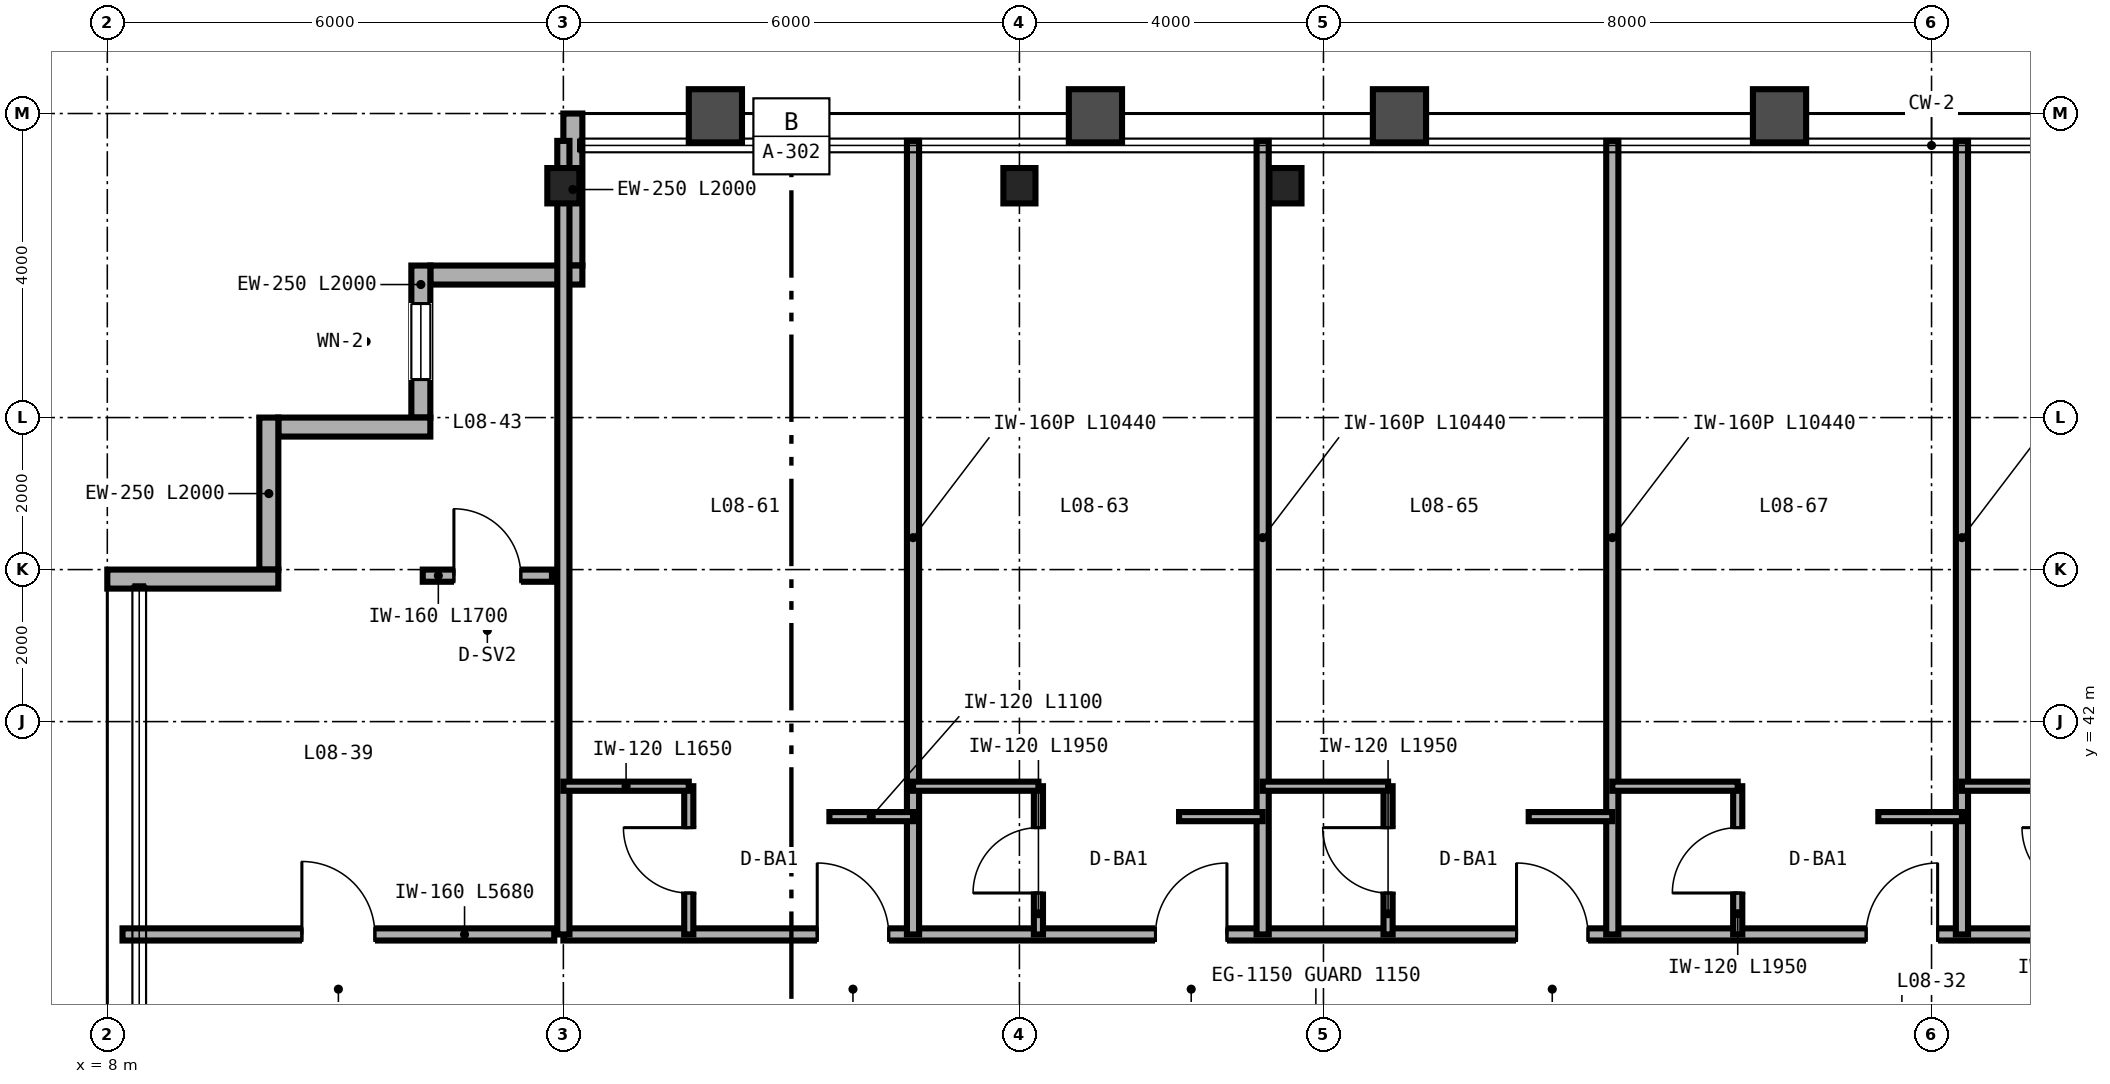
"""IFC4 building model, lengths in metres.
Left out: names, types, materials, properties, quantities, classifications, styles, units other than length and angle.
Written with IfcOpenShell. Run it as: python <this file> out.ifc"""

import sys

from ifc_helpers import new_model, si_unit, direction, frame, frame_2d, origin, origin_2d, place, context, subcontext, project, spatial, rectangle, i_section, extrude, source, transform, mapped, element, fill, save


model = new_model("IFC4")
c1 = context("Model", 3, precision=1e-05, world=origin(), true_north=direction((0.0, 1.0)))
c2 = subcontext(c1, "Body", "Model", "MODEL_VIEW")
j1 = project(units=[si_unit("LENGTHUNIT", "METRE"), si_unit("PLANEANGLEUNIT", "RADIAN")], contexts=[c1])
p1 = place(None, origin())
s1 = spatial("IfcSite", under=j1, at=p1, CompositionType="ELEMENT")
p2 = place(p1, origin())
s2 = spatial("IfcBuilding", under=s1, at=p2, CompositionType="ELEMENT")
p3 = place(p2, frame((0.0, 0.0, 38.4)))
s3 = spatial("IfcBuildingStorey", under=s2, at=p3, CompositionType="ELEMENT", Elevation=38.4)
m1 = source(origin(), c2, "Body", "SweptSolid", [
    extrude(i_section(OverallWidth=0.422, OverallDepth=0.465, WebThickness=0.045, FlangeThickness=0.073, FilletRadius=0.025, at=origin_2d()), origin(), (0.0, 0.0, 1.0), 3.35),
])
for number, where, z_axis, x_axis in (
    (1, (14.0, 49.05, 0.0), (0.0, 0.0, 1.0), (1.0, 0.0, 0.0)),
    (2, (20.0, 49.05, 0.0), (0.0, 0.0, 1.0), (1.0, 0.0, 0.0)),
    (3, (23.5, 49.05, 0.0), (0.0, 0.0, 1.0), (1.0, 0.0, 0.0)),
):
    element("IfcColumn", number, at=place(p3, frame(where, z_axis=z_axis, x_axis=x_axis)), inside=s3, PredefinedType="COLUMN", context=c2, shape_type="MappedRepresentation", body=[
        mapped(m1, transform((0.0, 0.0, 0.0), scale=1.0)),
    ])
p4 = place(p3, frame((14.125, 50.0, 0.0), z_axis=(0.0, 0.0, 1.0), x_axis=(0.0, -1.0, 0.0)))
e4 = element("IfcWall", 4, at=p4, inside=s3, PredefinedType="SOLIDWALL", context=c2, shape_type="SweptSolid", body=[
    extrude(rectangle(XDim=2.0, YDim=0.25, at=frame_2d((1.0, 0.0))), origin(), (0.0, 0.0, 1.0), 2.657),
])
p5 = place(p3, frame((14.25, 47.875, 0.0), z_axis=(0.0, 0.0, 1.0), x_axis=(-1.0, 0.0, 0.0)))
e5 = element("IfcWall", 5, at=p5, inside=s3, PredefinedType="SOLIDWALL", context=c2, shape_type="SweptSolid", body=[
    extrude(rectangle(XDim=2.0, YDim=0.25, at=frame_2d((1.0, 0.0))), origin(), (0.0, 0.0, 1.0), 3.35),
])
p6 = place(p3, frame((12.125, 48.0, 0.0), z_axis=(0.0, 0.0, 1.0), x_axis=(0.0, -1.0, 0.0)))
e6 = element("IfcWall", 6, at=p6, inside=s3, PredefinedType="SOLIDWALL", context=c2, shape_type="SweptSolid", body=[
    extrude(rectangle(XDim=2.0, YDim=0.25, at=frame_2d((1.0, 0.0))), origin(), (0.0, 0.0, 1.0), 3.35),
])
p7 = place(p6, frame((0.5, 0.0, 0.85)))
e7 = element("IfcOpeningElement", 7, at=p7, cuts=e6, PredefinedType="OPENING", context=c2, shape_type="SweptSolid", body=[
    extrude(rectangle(XDim=1.0, YDim=1.9, at=frame_2d((0.5, 0.95))), frame((0.0, 0.135, 0.0), z_axis=(0.0, -1.0, 0.0), x_axis=(1.0, 0.0, 0.0)), (0.0, 0.0, 1.0), 0.27),
])
for number, where, z_axis, x_axis in (
    (8, (12.25, 45.875, 0.0), (0.0, 0.0, 1.0), (-1.0, 0.0, 0.0)),
    (9, (10.125, 46.0, 0.0), (0.0, 0.0, 1.0), (0.0, -1.0, 0.0)),
):
    element("IfcWall", number, at=place(p3, frame(where, z_axis=z_axis, x_axis=x_axis)), inside=s3, PredefinedType="SOLIDWALL", context=c2, shape_type="SweptSolid", body=[
        extrude(rectangle(XDim=2.0, YDim=0.25, at=frame_2d((1.0, 0.0))), origin(), (0.0, 0.0, 1.0), 3.35),
    ])
p8 = place(p3, frame((10.25, 43.875, 0.0), z_axis=(0.0, 0.0, 1.0), x_axis=(-1.0, 0.0, 0.0)))
e10 = element("IfcWall", 10, at=p8, inside=s3, PredefinedType="SOLIDWALL", context=c2, shape_type="SweptSolid", body=[
    extrude(rectangle(XDim=2.25, YDim=0.25, at=frame_2d((1.125, 0.0))), origin(), (0.0, 0.0, 1.0), 3.35),
])
p9 = place(p3, frame((8.2, 39.2, 0.0), z_axis=(0.0, 0.0, 1.0), x_axis=(1.0, 0.0, 0.0)))
e11 = element("IfcWall", 11, at=p9, inside=s3, PredefinedType="PARTITIONING", context=c2, shape_type="SweptSolid", body=[
    extrude(rectangle(XDim=5.68, YDim=0.16, at=frame_2d((2.84, 0.0))), origin(), (0.0, 0.0, 1.0), 3.35),
])
p10 = place(p9, frame((2.36, 0.0, 0.0)))
e12 = element("IfcOpeningElement", 12, at=p10, cuts=e11, PredefinedType="OPENING", context=c2, shape_type="SweptSolid", body=[
    extrude(rectangle(XDim=0.96, YDim=2.15, at=frame_2d((0.48, 1.075))), frame((0.0, 0.09, 0.0), z_axis=(0.0, -1.0, 0.0), x_axis=(1.0, 0.0, 0.0)), (0.0, 0.0, 1.0), 0.18),
])
p11 = place(p3, frame((12.15, 43.92, 0.0), z_axis=(0.0, 0.0, 1.0), x_axis=(1.0, 0.0, 0.0)))
e13 = element("IfcWall", 13, at=p11, inside=s3, PredefinedType="PARTITIONING", context=c2, shape_type="SweptSolid", body=[
    extrude(rectangle(XDim=1.7, YDim=0.16, at=frame_2d((0.85, 0.0))), origin(), (0.0, 0.0, 1.0), 3.35),
])
p12 = place(p11, frame((0.41, 0.0, 0.0)))
e14 = element("IfcOpeningElement", 14, at=p12, cuts=e13, PredefinedType="OPENING", context=c2, shape_type="SweptSolid", body=[
    extrude(rectangle(XDim=0.88, YDim=2.15, at=frame_2d((0.44, 1.075))), frame((0.0, 0.09, 0.0), z_axis=(0.0, -1.0, 0.0), x_axis=(1.0, 0.0, 0.0)), (0.0, 0.0, 1.0), 0.18),
])
p13 = place(p3, frame((14.0, 39.2, 0.0), z_axis=(0.0, 0.0, 1.0), x_axis=(1.0, 0.0, 0.0)))
e15 = element("IfcWall", 15, at=p13, inside=s3, PredefinedType="PARTITIONING", context=c2, shape_type="SweptSolid", body=[
    extrude(rectangle(XDim=36.0, YDim=0.16, at=frame_2d((18.0, 0.0))), origin(), (0.0, 0.0, 1.0), 2.571),
])
p14 = place(p13, frame((3.34, 0.0, 0.0)))
e16 = element("IfcOpeningElement", 16, at=p14, cuts=e15, PredefinedType="OPENING", context=c2, shape_type="SweptSolid", body=[
    extrude(rectangle(XDim=0.94, YDim=2.15, at=frame_2d((0.47, 1.075))), frame((0.0, 0.09, 0.0), z_axis=(0.0, -1.0, 0.0), x_axis=(1.0, 0.0, 0.0)), (0.0, 0.0, 1.0), 0.18),
])
p15 = place(p13, frame((7.79, 0.0, 0.0)))
e17 = element("IfcOpeningElement", 17, at=p15, cuts=e15, PredefinedType="OPENING", context=c2, shape_type="SweptSolid", body=[
    extrude(rectangle(XDim=0.94, YDim=2.15, at=frame_2d((0.47, 1.075))), frame((0.0, 0.09, 0.0), z_axis=(0.0, -1.0, 0.0), x_axis=(1.0, 0.0, 0.0)), (0.0, 0.0, 1.0), 0.18),
])
p16 = place(p13, frame((12.54, 0.0, 0.0)))
e18 = element("IfcOpeningElement", 18, at=p16, cuts=e15, PredefinedType="OPENING", context=c2, shape_type="SweptSolid", body=[
    extrude(rectangle(XDim=0.94, YDim=2.15, at=frame_2d((0.47, 1.075))), frame((0.0, 0.09, 0.0), z_axis=(0.0, -1.0, 0.0), x_axis=(1.0, 0.0, 0.0)), (0.0, 0.0, 1.0), 0.18),
])
p17 = place(p13, frame((17.14, 0.0, 0.0)))
e19 = element("IfcOpeningElement", 19, at=p17, cuts=e15, PredefinedType="OPENING", context=c2, shape_type="SweptSolid", body=[
    extrude(rectangle(XDim=0.94, YDim=2.15, at=frame_2d((0.47, 1.075))), frame((0.0, 0.09, 0.0), z_axis=(0.0, -1.0, 0.0), x_axis=(1.0, 0.0, 0.0)), (0.0, 0.0, 1.0), 0.18),
])
p18 = place(p13, frame((21.74, 0.0, 0.0)))
e20 = element("IfcOpeningElement", 20, at=p18, cuts=e15, PredefinedType="OPENING", context=c2, shape_type="SweptSolid", body=[
    extrude(rectangle(XDim=0.94, YDim=2.15, at=frame_2d((0.47, 1.075))), frame((0.0, 0.09, 0.0), z_axis=(0.0, -1.0, 0.0), x_axis=(1.0, 0.0, 0.0)), (0.0, 0.0, 1.0), 0.18),
])
p19 = place(p13, frame((24.89, 0.0, 0.0)))
e21 = element("IfcOpeningElement", 21, at=p19, cuts=e15, PredefinedType="OPENING", context=c2, shape_type="SweptSolid", body=[
    extrude(rectangle(XDim=0.94, YDim=2.15, at=frame_2d((0.47, 1.075))), frame((0.0, 0.09, 0.0), z_axis=(0.0, -1.0, 0.0), x_axis=(1.0, 0.0, 0.0)), (0.0, 0.0, 1.0), 0.18),
])
p20 = place(p13, frame((30.54, 0.0, 0.0)))
e22 = element("IfcOpeningElement", 22, at=p20, cuts=e15, PredefinedType="OPENING", context=c2, shape_type="SweptSolid", body=[
    extrude(rectangle(XDim=0.94, YDim=2.15, at=frame_2d((0.47, 1.075))), frame((0.0, 0.09, 0.0), z_axis=(0.0, -1.0, 0.0), x_axis=(1.0, 0.0, 0.0)), (0.0, 0.0, 1.0), 0.18),
])
p21 = place(p13, frame((34.74, 0.0, 0.0)))
e23 = element("IfcOpeningElement", 23, at=p21, cuts=e15, PredefinedType="OPENING", context=c2, shape_type="SweptSolid", body=[
    extrude(rectangle(XDim=0.94, YDim=2.15, at=frame_2d((0.47, 1.075))), frame((0.0, 0.09, 0.0), z_axis=(0.0, -1.0, 0.0), x_axis=(1.0, 0.0, 0.0)), (0.0, 0.0, 1.0), 0.18),
])
for number, where, z_axis, x_axis in (
    (24, (14.0, 39.2, 0.0), (0.0, 0.0, 1.0), (0.0, 1.0, 0.0)),
    (25, (18.6, 39.2, 0.0), (0.0, 0.0, 1.0), (0.0, 1.0, 0.0)),
):
    element("IfcWall", number, at=place(p3, frame(where, z_axis=z_axis, x_axis=x_axis)), inside=s3, PredefinedType="PARTITIONING", context=c2, shape_type="SweptSolid", body=[
        extrude(rectangle(XDim=10.44, YDim=0.16, at=frame_2d((5.22, 0.0))), origin(), (0.0, 0.0, 1.0), 2.657),
    ])
p22 = place(p3, frame((15.65, 39.2, 0.0), z_axis=(0.0, 0.0, 1.0), x_axis=(0.0, 1.0, 0.0)))
e26 = element("IfcWall", 26, at=p22, inside=s3, PredefinedType="PARTITIONING", context=c2, shape_type="SweptSolid", body=[
    extrude(rectangle(XDim=1.95, YDim=0.12, at=frame_2d((0.975, 0.0))), origin(), (0.0, 0.0, 1.0), 3.35),
])
p23 = place(p22, frame((0.545, 0.0, 0.0)))
e27 = element("IfcOpeningElement", 27, at=p23, cuts=e26, PredefinedType="OPENING", context=c2, shape_type="SweptSolid", body=[
    extrude(rectangle(XDim=0.86, YDim=2.1, at=frame_2d((0.43, 1.05))), frame((0.0, 0.07, 0.0), z_axis=(0.0, -1.0, 0.0), x_axis=(1.0, 0.0, 0.0)), (0.0, 0.0, 1.0), 0.14),
])
p24 = place(p3, frame((14.0, 41.15, 0.0), z_axis=(0.0, 0.0, 1.0), x_axis=(1.0, 0.0, 0.0)))
e28 = element("IfcWall", 28, at=p24, inside=s3, PredefinedType="PARTITIONING", context=c2, shape_type="SweptSolid", body=[
    extrude(rectangle(XDim=1.65, YDim=0.12, at=frame_2d((0.825, 0.0))), origin(), (0.0, 0.0, 1.0), 3.35),
])
p25 = place(p3, frame((17.5, 40.75, 0.0), z_axis=(0.0, 0.0, 1.0), x_axis=(1.0, 0.0, 0.0)))
e29 = element("IfcWall", 29, at=p25, inside=s3, PredefinedType="PARTITIONING", context=c2, shape_type="SweptSolid", body=[
    extrude(rectangle(XDim=1.1, YDim=0.12, at=frame_2d((0.55, 0.0))), origin(), (0.0, 0.0, 1.0), 3.35),
])
p26 = place(p3, frame((23.2, 39.2, 0.0), z_axis=(0.0, 0.0, 1.0), x_axis=(0.0, 1.0, 0.0)))
e30 = element("IfcWall", 30, at=p26, inside=s3, PredefinedType="PARTITIONING", context=c2, shape_type="SweptSolid", body=[
    extrude(rectangle(XDim=10.44, YDim=0.16, at=frame_2d((5.22, 0.0))), origin(), (0.0, 0.0, 1.0), 2.813),
])
p27 = place(p3, frame((20.25, 39.2, 0.0), z_axis=(0.0, 0.0, 1.0), x_axis=(0.0, 1.0, 0.0)))
e31 = element("IfcWall", 31, at=p27, inside=s3, PredefinedType="PARTITIONING", context=c2, shape_type="SweptSolid", body=[
    extrude(rectangle(XDim=1.95, YDim=0.12, at=frame_2d((0.975, 0.0))), origin(), (0.0, 0.0, 1.0), 3.35),
])
p28 = place(p27, frame((0.545, 0.0, 0.0)))
e32 = element("IfcOpeningElement", 32, at=p28, cuts=e31, PredefinedType="OPENING", context=c2, shape_type="SweptSolid", body=[
    extrude(rectangle(XDim=0.86, YDim=2.1, at=frame_2d((0.43, 1.05))), frame((0.0, 0.07, 0.0), z_axis=(0.0, -1.0, 0.0), x_axis=(1.0, 0.0, 0.0)), (0.0, 0.0, 1.0), 0.14),
])
p29 = place(p3, frame((18.6, 41.15, 0.0), z_axis=(0.0, 0.0, 1.0), x_axis=(1.0, 0.0, 0.0)))
e33 = element("IfcWall", 33, at=p29, inside=s3, PredefinedType="PARTITIONING", context=c2, shape_type="SweptSolid", body=[
    extrude(rectangle(XDim=1.65, YDim=0.12, at=frame_2d((0.825, 0.0))), origin(), (0.0, 0.0, 1.0), 3.35),
])
p30 = place(p3, frame((22.1, 40.75, 0.0), z_axis=(0.0, 0.0, 1.0), x_axis=(1.0, 0.0, 0.0)))
e34 = element("IfcWall", 34, at=p30, inside=s3, PredefinedType="PARTITIONING", context=c2, shape_type="SweptSolid", body=[
    extrude(rectangle(XDim=1.1, YDim=0.12, at=frame_2d((0.55, 0.0))), origin(), (0.0, 0.0, 1.0), 3.35),
])
p31 = place(p3, frame((27.8, 39.2, 0.0), z_axis=(0.0, 0.0, 1.0), x_axis=(0.0, 1.0, 0.0)))
e35 = element("IfcWall", 35, at=p31, inside=s3, PredefinedType="PARTITIONING", context=c2, shape_type="SweptSolid", body=[
    extrude(rectangle(XDim=10.44, YDim=0.16, at=frame_2d((5.22, 0.0))), origin(), (0.0, 0.0, 1.0), 2.423),
])
p32 = place(p3, frame((24.85, 39.2, 0.0), z_axis=(0.0, 0.0, 1.0), x_axis=(0.0, 1.0, 0.0)))
e36 = element("IfcWall", 36, at=p32, inside=s3, PredefinedType="PARTITIONING", context=c2, shape_type="SweptSolid", body=[
    extrude(rectangle(XDim=1.95, YDim=0.12, at=frame_2d((0.975, 0.0))), origin(), (0.0, 0.0, 1.0), 3.35),
])
p33 = place(p32, frame((0.545, 0.0, 0.0)))
e37 = element("IfcOpeningElement", 37, at=p33, cuts=e36, PredefinedType="OPENING", context=c2, shape_type="SweptSolid", body=[
    extrude(rectangle(XDim=0.86, YDim=2.1, at=frame_2d((0.43, 1.05))), frame((0.0, 0.07, 0.0), z_axis=(0.0, -1.0, 0.0), x_axis=(1.0, 0.0, 0.0)), (0.0, 0.0, 1.0), 0.14),
])
p34 = place(p3, frame((23.2, 41.15, 0.0), z_axis=(0.0, 0.0, 1.0), x_axis=(1.0, 0.0, 0.0)))
e38 = element("IfcWall", 38, at=p34, inside=s3, PredefinedType="PARTITIONING", context=c2, shape_type="SweptSolid", body=[
    extrude(rectangle(XDim=1.65, YDim=0.12, at=frame_2d((0.825, 0.0))), origin(), (0.0, 0.0, 1.0), 2.571),
])
p35 = place(p3, frame((26.7, 40.75, 0.0), z_axis=(0.0, 0.0, 1.0), x_axis=(1.0, 0.0, 0.0)))
e39 = element("IfcWall", 39, at=p35, inside=s3, PredefinedType="PARTITIONING", context=c2, shape_type="SweptSolid", body=[
    extrude(rectangle(XDim=1.1, YDim=0.12, at=frame_2d((0.55, 0.0))), origin(), (0.0, 0.0, 1.0), 3.35),
])
p36 = place(p3, frame((32.4, 39.2, 0.0), z_axis=(0.0, 0.0, 1.0), x_axis=(0.0, 1.0, 0.0)))
e40 = element("IfcWall", 40, at=p36, inside=s3, PredefinedType="PARTITIONING", context=c2, shape_type="SweptSolid", body=[
    extrude(rectangle(XDim=10.44, YDim=0.16, at=frame_2d((5.22, 0.0))), origin(), (0.0, 0.0, 1.0), 2.423),
])
p37 = place(p3, frame((29.45, 39.2, 0.0), z_axis=(0.0, 0.0, 1.0), x_axis=(0.0, 1.0, 0.0)))
e41 = element("IfcWall", 41, at=p37, inside=s3, PredefinedType="PARTITIONING", context=c2, shape_type="SweptSolid", body=[
    extrude(rectangle(XDim=1.95, YDim=0.12, at=frame_2d((0.975, 0.0))), origin(), (0.0, 0.0, 1.0), 3.35),
])
p38 = place(p37, frame((0.545, 0.0, 0.0)))
e42 = element("IfcOpeningElement", 42, at=p38, cuts=e41, PredefinedType="OPENING", context=c2, shape_type="SweptSolid", body=[
    extrude(rectangle(XDim=0.86, YDim=2.1, at=frame_2d((0.43, 1.05))), frame((0.0, 0.07, 0.0), z_axis=(0.0, -1.0, 0.0), x_axis=(1.0, 0.0, 0.0)), (0.0, 0.0, 1.0), 0.14),
])
p39 = place(p3, frame((27.8, 41.15, 0.0), z_axis=(0.0, 0.0, 1.0), x_axis=(1.0, 0.0, 0.0)))
e43 = element("IfcWall", 43, at=p39, inside=s3, PredefinedType="PARTITIONING", context=c2, shape_type="SweptSolid", body=[
    extrude(rectangle(XDim=1.65, YDim=0.12, at=frame_2d((0.825, 0.0))), origin(), (0.0, 0.0, 1.0), 3.35),
])
p40 = place(p3, frame((31.3, 40.75, 0.0), z_axis=(0.0, 0.0, 1.0), x_axis=(1.0, 0.0, 0.0)))
e44 = element("IfcWall", 44, at=p40, inside=s3, PredefinedType="PARTITIONING", context=c2, shape_type="SweptSolid", body=[
    extrude(rectangle(XDim=1.1, YDim=0.12, at=frame_2d((0.55, 0.0))), origin(), (0.0, 0.0, 1.0), 3.35),
])
p41 = place(p3, frame((32.4, 41.15, 0.0), z_axis=(0.0, 0.0, 1.0), x_axis=(1.0, 0.0, 0.0)))
e45 = element("IfcWall", 45, at=p41, inside=s3, PredefinedType="PARTITIONING", context=c2, shape_type="SweptSolid", body=[
    extrude(rectangle(XDim=1.65, YDim=0.12, at=frame_2d((0.825, 0.0))), origin(), (0.0, 0.0, 1.0), 3.35),
])
m2 = source(origin(), c2, "Body", "SweptSolid", [
    extrude(rectangle(XDim=1.0, YDim=1.9, at=frame_2d((0.5, 0.95))), frame((0.0, 0.03, 0.0), z_axis=(0.0, -1.0, 0.0), x_axis=(1.0, 0.0, 0.0)), (0.0, 0.0, 1.0), 0.06),
])
p42 = place(p7, origin())
e46 = element("IfcWindow", 46, at=p42, inside=s3, PartitioningType="SINGLE_PANEL", PredefinedType="WINDOW", context=c2, shape_type="MappedRepresentation", body=[
    mapped(m2, transform((0.0, 0.0, 0.0), scale=1.0)),
])
fill(e7, e46)
m3 = source(origin(), c2, "Body", "SweptSolid", [
    extrude(rectangle(XDim=0.96, YDim=2.15, at=frame_2d((0.48, 1.075))), frame((0.0, 0.025, 0.0), z_axis=(0.0, -1.0, 0.0), x_axis=(1.0, 0.0, 0.0)), (0.0, 0.0, 1.0), 0.05),
])
p43 = place(p10, origin())
e47 = element("IfcDoor", 47, at=p43, inside=s3, OperationType="SINGLE_SWING_LEFT", PredefinedType="DOOR", context=c2, shape_type="MappedRepresentation", body=[
    mapped(m3, transform((0.0, 0.0, 0.0), scale=1.0)),
])
fill(e12, e47)
m4 = source(origin(), c2, "Body", "SweptSolid", [
    extrude(rectangle(XDim=0.88, YDim=2.15, at=frame_2d((0.44, 1.075))), frame((0.0, 0.025, 0.0), z_axis=(0.0, -1.0, 0.0), x_axis=(1.0, 0.0, 0.0)), (0.0, 0.0, 1.0), 0.05),
])
p44 = place(p12, origin())
e48 = element("IfcDoor", 48, at=p44, inside=s3, OperationType="SINGLE_SWING_LEFT", PredefinedType="DOOR", context=c2, shape_type="MappedRepresentation", body=[
    mapped(m4, transform((0.0, 0.0, 0.0), scale=1.0)),
])
fill(e14, e48)
m5 = source(origin(), c2, "Body", "SweptSolid", [
    extrude(rectangle(XDim=0.86, YDim=2.1, at=frame_2d((0.43, 1.05))), frame((0.0, 0.025, 0.0), z_axis=(0.0, -1.0, 0.0), x_axis=(1.0, 0.0, 0.0)), (0.0, 0.0, 1.0), 0.05),
])
p45 = place(p23, origin())
e49 = element("IfcDoor", 49, at=p45, inside=s3, OperationType="SINGLE_SWING_RIGHT", PredefinedType="DOOR", context=c2, shape_type="MappedRepresentation", body=[
    mapped(m5, transform((0.0, 0.0, 0.0), scale=1.0)),
])
fill(e27, e49)
p46 = place(p28, origin())
e50 = element("IfcDoor", 50, at=p46, inside=s3, OperationType="SINGLE_SWING_LEFT", PredefinedType="DOOR", context=c2, shape_type="MappedRepresentation", body=[
    mapped(m5, transform((0.0, 0.0, 0.0), scale=1.0)),
])
fill(e32, e50)
p47 = place(p33, origin())
e51 = element("IfcDoor", 51, at=p47, inside=s3, OperationType="SINGLE_SWING_RIGHT", PredefinedType="DOOR", context=c2, shape_type="MappedRepresentation", body=[
    mapped(m5, transform((0.0, 0.0, 0.0), scale=1.0)),
])
fill(e37, e51)
p48 = place(p38, origin())
e52 = element("IfcDoor", 52, at=p48, inside=s3, OperationType="SINGLE_SWING_LEFT", PredefinedType="DOOR", context=c2, shape_type="MappedRepresentation", body=[
    mapped(m5, transform((0.0, 0.0, 0.0), scale=1.0)),
])
fill(e42, e52)
m6 = source(origin(), c2, "Body", "SweptSolid", [
    extrude(rectangle(XDim=0.94, YDim=2.15, at=frame_2d((0.47, 1.075))), frame((0.0, 0.025, 0.0), z_axis=(0.0, -1.0, 0.0), x_axis=(1.0, 0.0, 0.0)), (0.0, 0.0, 1.0), 0.05),
])
p49 = place(p14, origin())
e53 = element("IfcDoor", 53, at=p49, inside=s3, OperationType="SINGLE_SWING_LEFT", PredefinedType="DOOR", context=c2, shape_type="MappedRepresentation", body=[
    mapped(m6, transform((0.0, 0.0, 0.0), scale=1.0)),
])
fill(e16, e53)
p50 = place(p15, origin())
e54 = element("IfcDoor", 54, at=p50, inside=s3, OperationType="SINGLE_SWING_RIGHT", PredefinedType="DOOR", context=c2, shape_type="MappedRepresentation", body=[
    mapped(m6, transform((0.0, 0.0, 0.0), scale=1.0)),
])
fill(e17, e54)
p51 = place(p16, origin())
e55 = element("IfcDoor", 55, at=p51, inside=s3, OperationType="SINGLE_SWING_LEFT", PredefinedType="DOOR", context=c2, shape_type="MappedRepresentation", body=[
    mapped(m6, transform((0.0, 0.0, 0.0), scale=1.0)),
])
fill(e18, e55)
p52 = place(p17, origin())
e56 = element("IfcDoor", 56, at=p52, inside=s3, OperationType="SINGLE_SWING_RIGHT", PredefinedType="DOOR", context=c2, shape_type="MappedRepresentation", body=[
    mapped(m6, transform((0.0, 0.0, 0.0), scale=1.0)),
])
fill(e19, e56)
save(model, sys.argv[1])
